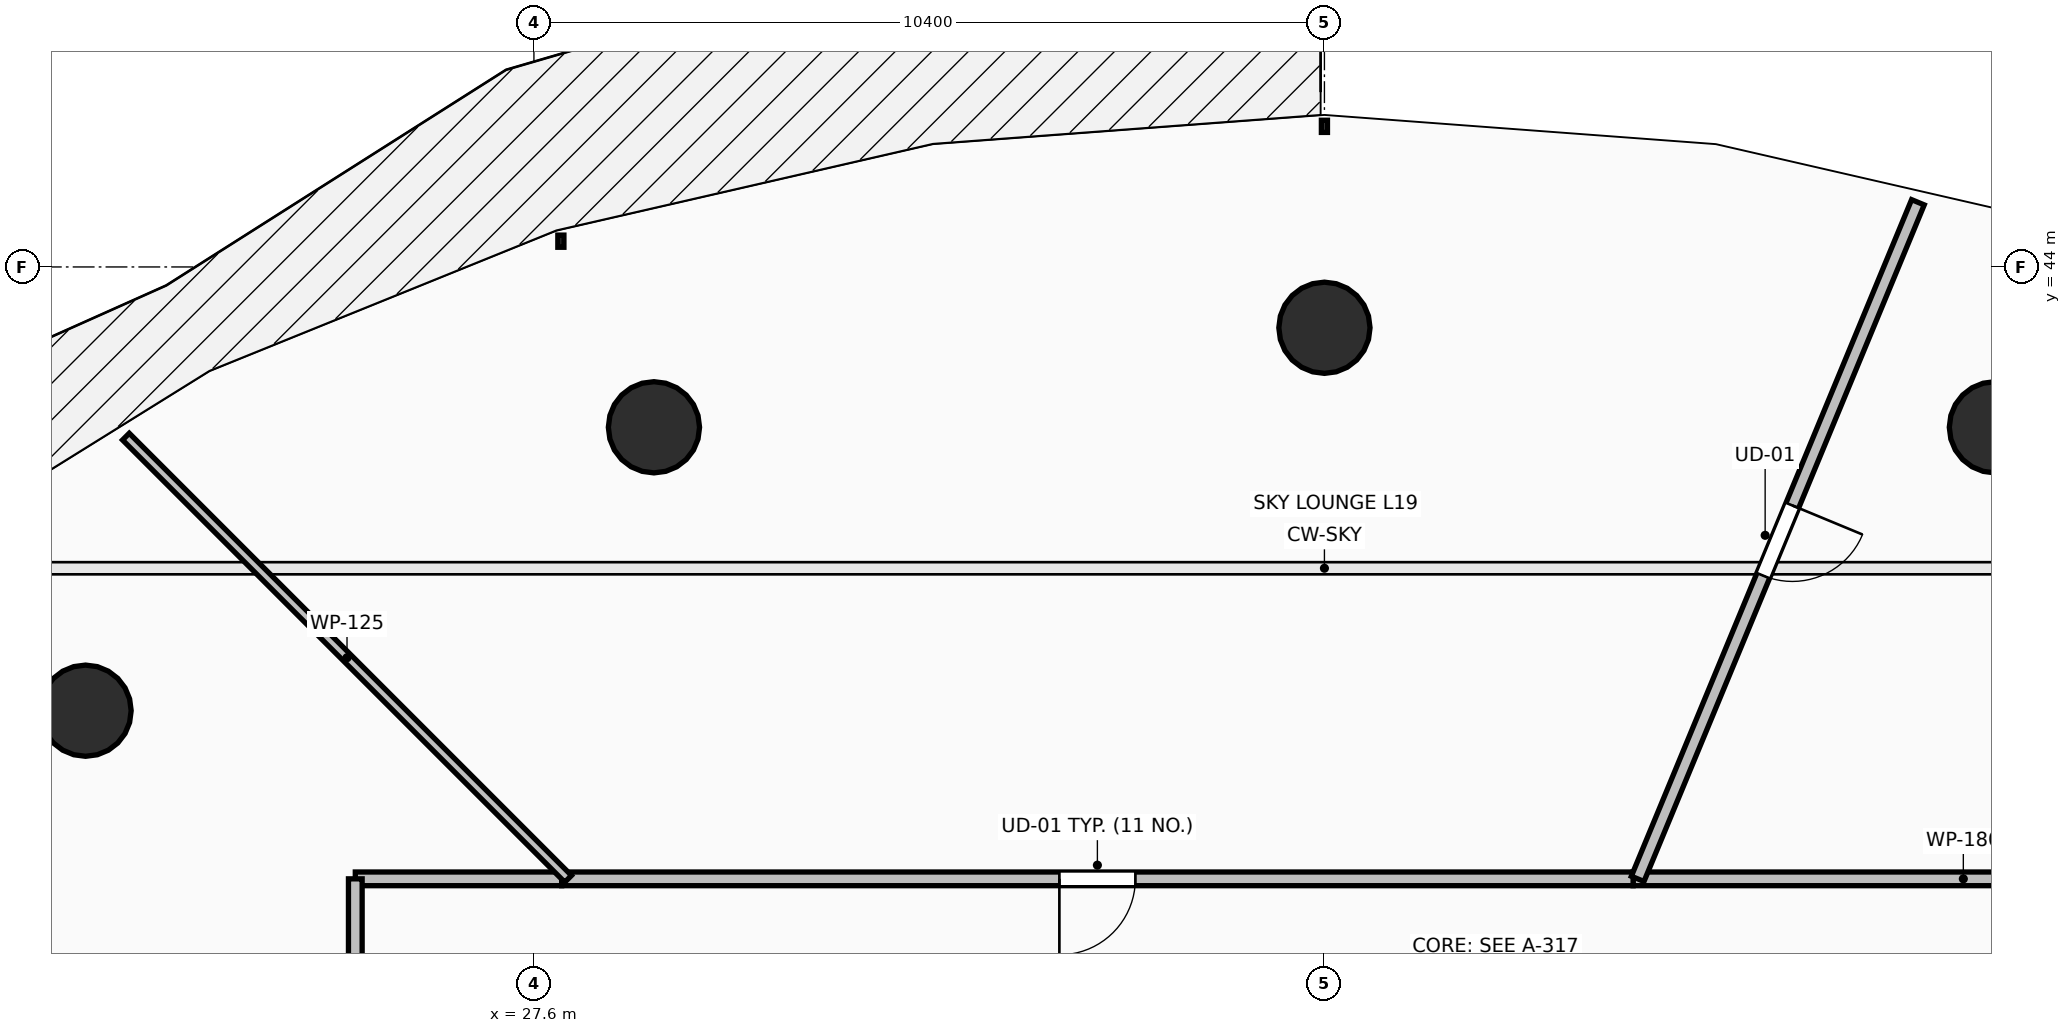
"""IFC4 building model, lengths in metres.
Left out: names, types, materials, properties, quantities, classifications, styles, units other than length and angle.
Written with IfcOpenShell. Run it as: python <this file> out.ifc"""

import sys

from ifc_helpers import new_model, si_unit, direction, frame, frame_2d, origin, origin_2d, place, context, subcontext, project, spatial, rectangle, circle, extrude, element, fill, save


model = new_model("IFC4")
c1 = context("Model", 3, precision=1e-05, world=origin(), true_north=direction((0.0, 1.0)))
c2 = subcontext(c1, "Body", "Model", "MODEL_VIEW")
j1 = project(units=[si_unit("LENGTHUNIT", "METRE"), si_unit("PLANEANGLEUNIT", "RADIAN")], contexts=[c1])
p1 = place(None, origin())
s1 = spatial("IfcSite", under=j1, at=p1, CompositionType="ELEMENT")
p2 = place(p1, origin())
s2 = spatial("IfcBuilding", under=s1, at=p2, CompositionType="ELEMENT")
p3 = place(p2, frame((0.0, 0.0, 74.3)))
s3 = spatial("IfcBuildingStorey", under=s2, at=p3, CompositionType="ELEMENT", Elevation=74.3)
for number, where, z_axis, x_axis in (
    (1, (46.821, 41.891, 0.0), (0.0, 0.0, 1.0), (0.383, 0.924, 0.0)),
    (2, (38.0, 43.2, 0.0), (0.0, 0.0, 1.0), (0.0, 1.0, 0.0)),
    (3, (29.179, 41.891, 0.0), (0.0, 0.0, 1.0), (-0.383, 0.924, 0.0)),
    (4, (21.701, 38.162, 0.0), (0.0, 0.0, 1.0), (-0.707, 0.707, 0.0)),
):
    element("IfcColumn", number, at=place(p3, frame(where, z_axis=z_axis, x_axis=x_axis)), inside=s3, PredefinedType="COLUMN", context=c2, shape_type="SweptSolid", body=[
        extrude(circle(Radius=0.6, at=origin_2d()), origin(), (0.0, 0.0, 1.0), 4.5),
    ])
p4 = place(p3, frame((50.75, 35.95, 0.0), z_axis=(0.0, 0.0, 1.0), x_axis=(-1.0, 0.0, 0.0)))
e5 = element("IfcWall", 5, at=p4, inside=s3, PredefinedType="PARTITIONING", context=c2, shape_type="SweptSolid", body=[
    extrude(rectangle(XDim=8.689, YDim=0.18, at=frame_2d((4.344, 0.0))), origin(), (0.0, 0.0, 1.0), 3.432),
])
p5 = place(p3, frame((42.061, 35.95, 0.0), z_axis=(0.0, 0.0, 1.0), x_axis=(-1.0, 0.0, 0.0)))
e6 = element("IfcWall", 6, at=p5, inside=s3, PredefinedType="PARTITIONING", context=c2, shape_type="SweptSolid", body=[
    extrude(rectangle(XDim=14.096, YDim=0.18, at=frame_2d((7.048, 0.0))), origin(), (0.0, 0.0, 1.0), 3.432),
])
p6 = place(p5, frame((6.548, 0.0, 0.0)))
e7 = element("IfcOpeningElement", 7, at=p6, cuts=e6, PredefinedType="OPENING", context=c2, shape_type="SweptSolid", body=[
    extrude(rectangle(XDim=1.0, YDim=2.15, at=frame_2d((0.5, 1.075))), frame((0.0, 0.105, 0.0), z_axis=(0.0, -1.0, 0.0), x_axis=(1.0, 0.0, 0.0)), (0.0, 0.0, 1.0), 0.21),
])
p7 = place(p3, frame((27.965, 35.95, 0.0), z_axis=(0.0, 0.0, 1.0), x_axis=(-1.0, 0.0, 0.0)))
e8 = element("IfcWall", 8, at=p7, inside=s3, PredefinedType="PARTITIONING", context=c2, shape_type="SweptSolid", body=[
    extrude(rectangle(XDim=2.715, YDim=0.18, at=frame_2d((1.357, 0.0))), origin(), (0.0, 0.0, 1.0), 3.432),
])
p8 = place(p3, frame((25.25, 35.95, 0.0), z_axis=(0.0, 0.0, 1.0), x_axis=(0.0, -1.0, 0.0)))
e9 = element("IfcWall", 9, at=p8, inside=s3, PredefinedType="PARTITIONING", context=c2, shape_type="SweptSolid", body=[
    extrude(rectangle(XDim=15.296, YDim=0.18, at=frame_2d((7.648, 0.0))), origin(), (0.0, 0.0, 1.0), 3.432),
])
p9 = place(p8, frame((7.148, 0.0, 0.0)))
e10 = element("IfcOpeningElement", 10, at=p9, cuts=e9, PredefinedType="OPENING", context=c2, shape_type="SweptSolid", body=[
    extrude(rectangle(XDim=1.0, YDim=2.15, at=frame_2d((0.5, 1.075))), frame((0.0, 0.105, 0.0), z_axis=(0.0, -1.0, 0.0), x_axis=(1.0, 0.0, 0.0)), (0.0, 0.0, 1.0), 0.21),
])
p10 = place(p3, frame((45.808, 44.851, 0.0), z_axis=(0.0, 0.0, 1.0), x_axis=(-0.382687492799, -0.923877850614, 0.0)))
e11 = element("IfcWall", 11, at=p10, inside=s3, PredefinedType="PARTITIONING", context=c2, shape_type="SweptSolid", body=[
    extrude(rectangle(XDim=9.635, YDim=0.18, at=frame_2d((4.817, 0.0))), origin(), (0.0, 0.0, 1.0), 3.624),
])
p11 = place(p10, frame((4.317, 0.0, 0.0)))
e12 = element("IfcOpeningElement", 12, at=p11, cuts=e11, PredefinedType="OPENING", context=c2, shape_type="SweptSolid", body=[
    extrude(rectangle(XDim=1.0, YDim=2.15, at=frame_2d((0.5, 1.075))), frame((0.0, 0.105, 0.0), z_axis=(0.0, -1.0, 0.0), x_axis=(1.0, 0.0, 0.0)), (0.0, 0.0, 1.0), 0.21),
])
p12 = place(p3, frame((22.232, 41.768, 0.0), z_axis=(0.0, 0.0, 1.0), x_axis=(0.707106781187, -0.707106781187, 0.0)))
e13 = element("IfcWall", 13, at=p12, inside=s3, PredefinedType="PARTITIONING", context=c2, shape_type="SweptSolid", body=[
    extrude(rectangle(XDim=8.228, YDim=0.125, at=frame_2d((4.114, 0.0))), origin(), (0.0, 0.0, 1.0), 3.432),
])
p13 = place(p6, origin())
e14 = element("IfcDoor", 14, at=p13, inside=s3, OperationType="SINGLE_SWING_RIGHT", PredefinedType="DOOR", context=c2, shape_type="SweptSolid", body=[
    extrude(rectangle(XDim=1.0, YDim=2.15, at=frame_2d((0.5, 1.075))), frame((0.0, 0.025, 0.0), z_axis=(0.0, -1.0, 0.0), x_axis=(1.0, 0.0, 0.0)), (0.0, 0.0, 1.0), 0.05),
])
fill(e7, e14)
p14 = place(p11, origin())
e15 = element("IfcDoor", 15, at=p14, inside=s3, OperationType="SINGLE_SWING_LEFT", PredefinedType="DOOR", context=c2, shape_type="SweptSolid", body=[
    extrude(rectangle(XDim=1.0, YDim=2.15, at=frame_2d((0.5, 1.075))), frame((0.0, 0.025, 0.0), z_axis=(0.0, -1.0, 0.0), x_axis=(1.0, 0.0, 0.0)), (0.0, 0.0, 1.0), 0.05),
])
fill(e12, e15)
save(model, sys.argv[1])
